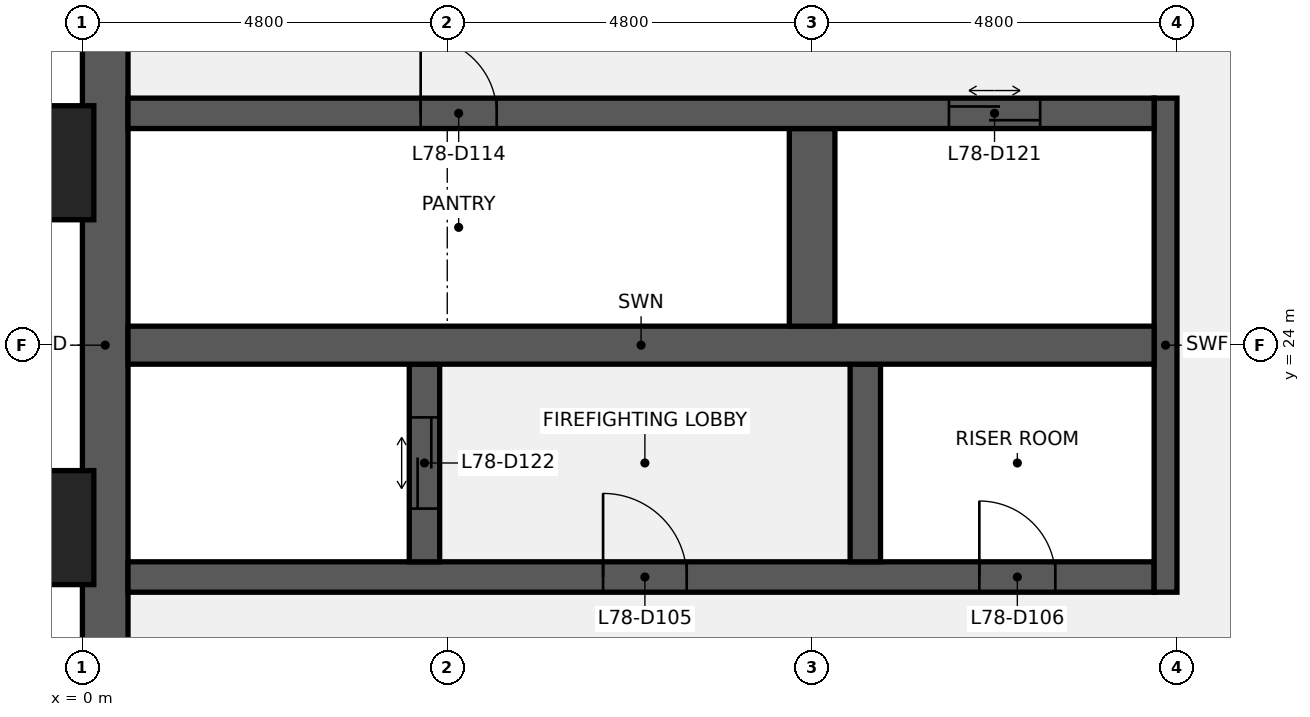
"""IFC4 building model, lengths in metres.
Left out: names, types, materials, properties, quantities, classifications, styles, units other than length and angle.
Written with IfcOpenShell. Run it as: python <this file> out.ifc"""

import sys

from ifc_helpers import new_model, si_unit, direction, frame, frame_2d, origin, origin_2d, place, context, subcontext, project, spatial, rectangle, extrude, element, fill, save


model = new_model("IFC4")
c1 = context("Model", 3, precision=1e-05, world=origin(), true_north=direction((0.0, 1.0)))
c2 = subcontext(c1, "Body", "Model", "MODEL_VIEW")
j1 = project(units=[si_unit("LENGTHUNIT", "METRE"), si_unit("PLANEANGLEUNIT", "RADIAN")], contexts=[c1])
p1 = place(None, origin())
s1 = spatial("IfcSite", under=j1, at=p1, CompositionType="ELEMENT")
p2 = place(p1, origin())
s2 = spatial("IfcBuilding", under=s1, at=p2, CompositionType="ELEMENT")
p3 = place(p2, frame((0.0, 0.0, 350.3)))
s3 = spatial("IfcBuildingStorey", under=s2, at=p3, CompositionType="ELEMENT", Elevation=350.3)
p4 = place(p3, frame((0.3, 9.6, 0.0), z_axis=(0.0, 0.0, 1.0), x_axis=(0.0, 1.0, 0.0)))
e1 = element("IfcWall", 1, at=p4, inside=s3, PredefinedType="SHEAR", context=c2, shape_type="SweptSolid", body=[
    extrude(rectangle(XDim=28.8, YDim=0.6, at=frame_2d((14.4, 0.0))), origin(), (0.0, 0.0, 1.0), 3.75),
])
p5 = place(p4, frame((8.85, 0.0, 0.9)))
e2 = element("IfcOpeningElement", 2, at=p5, cuts=e1, PredefinedType="OPENING", context=c2, shape_type="SweptSolid", body=[
    extrude(rectangle(XDim=1.5, YDim=1.5, at=frame_2d((0.75, 0.75))), frame((0.0, 0.31, 0.0), z_axis=(0.0, -1.0, 0.0), x_axis=(1.0, 0.0, 0.0)), (0.0, 0.0, 1.0), 0.62),
])
p6 = place(p4, frame((18.45, 0.0, 0.9)))
e3 = element("IfcOpeningElement", 3, at=p6, cuts=e1, PredefinedType="OPENING", context=c2, shape_type="SweptSolid", body=[
    extrude(rectangle(XDim=1.5, YDim=1.5, at=frame_2d((0.75, 0.75))), frame((0.0, 0.31, 0.0), z_axis=(0.0, -1.0, 0.0), x_axis=(1.0, 0.0, 0.0)), (0.0, 0.0, 1.0), 0.62),
])
p7 = place(p3, frame((0.6, 20.95, 0.0), z_axis=(0.0, 0.0, 1.0), x_axis=(1.0, 0.0, 0.0)))
e4 = element("IfcWall", 4, at=p7, inside=s3, PredefinedType="SHEAR", context=c2, shape_type="SweptSolid", body=[
    extrude(rectangle(XDim=13.5, YDim=0.4, at=frame_2d((6.75, 0.0))), origin(), (0.0, 0.0, 1.0), 3.75),
])
p8 = place(p7, frame((6.25, 0.0, 0.0)))
e5 = element("IfcOpeningElement", 5, at=p8, cuts=e4, PredefinedType="OPENING", context=c2, shape_type="SweptSolid", body=[
    extrude(rectangle(XDim=1.1, YDim=2.1, at=frame_2d((0.55, 1.05))), frame((0.0, 0.21, 0.0), z_axis=(0.0, -1.0, 0.0), x_axis=(1.0, 0.0, 0.0)), (0.0, 0.0, 1.0), 0.42),
])
p9 = place(p7, frame((11.2, 0.0, 0.0)))
e6 = element("IfcOpeningElement", 6, at=p9, cuts=e4, PredefinedType="OPENING", context=c2, shape_type="SweptSolid", body=[
    extrude(rectangle(XDim=1.0, YDim=2.1, at=frame_2d((0.5, 1.05))), frame((0.0, 0.21, 0.0), z_axis=(0.0, -1.0, 0.0), x_axis=(1.0, 0.0, 0.0)), (0.0, 0.0, 1.0), 0.42),
])
p10 = place(p3, frame((14.25, 20.75, 0.0), z_axis=(0.0, 0.0, 1.0), x_axis=(0.0, 1.0, 0.0)))
e7 = element("IfcWall", 7, at=p10, inside=s3, PredefinedType="SHEAR", context=c2, shape_type="SweptSolid", body=[
    extrude(rectangle(XDim=6.5, YDim=0.3, at=frame_2d((3.25, 0.0))), origin(), (0.0, 0.0, 1.0), 3.75),
])
p11 = place(p3, frame((4.5, 21.15, 0.0), z_axis=(0.0, 0.0, 1.0), x_axis=(0.0, 1.0, 0.0)))
e8 = element("IfcWall", 8, at=p11, inside=s3, PredefinedType="SHEAR", context=c2, shape_type="SweptSolid", body=[
    extrude(rectangle(XDim=2.6, YDim=0.4, at=frame_2d((1.3, 0.0))), origin(), (0.0, 0.0, 1.0), 3.75),
])
p12 = place(p11, frame((0.7, 0.0, 0.0)))
e9 = element("IfcOpeningElement", 9, at=p12, cuts=e8, PredefinedType="OPENING", context=c2, shape_type="SweptSolid", body=[
    extrude(rectangle(XDim=1.2, YDim=2.1, at=frame_2d((0.6, 1.05))), frame((0.0, 0.21, 0.0), z_axis=(0.0, -1.0, 0.0), x_axis=(1.0, 0.0, 0.0)), (0.0, 0.0, 1.0), 0.42),
])
p13 = place(p3, frame((10.3, 21.15, 0.0), z_axis=(0.0, 0.0, 1.0), x_axis=(0.0, 1.0, 0.0)))
e10 = element("IfcWall", 10, at=p13, inside=s3, PredefinedType="SHEAR", context=c2, shape_type="SweptSolid", body=[
    extrude(rectangle(XDim=2.6, YDim=0.4, at=frame_2d((1.3, 0.0))), origin(), (0.0, 0.0, 1.0), 3.75),
])
p14 = place(p3, frame((0.6, 24.0, 0.0), z_axis=(0.0, 0.0, 1.0), x_axis=(1.0, 0.0, 0.0)))
e11 = element("IfcWall", 11, at=p14, inside=s3, PredefinedType="SHEAR", context=c2, shape_type="SweptSolid", body=[
    extrude(rectangle(XDim=13.5, YDim=0.5, at=frame_2d((6.75, 0.0))), origin(), (0.0, 0.0, 1.0), 3.75),
])
p15 = place(p3, frame((9.6, 24.25, 0.0), z_axis=(0.0, 0.0, 1.0), x_axis=(0.0, 1.0, 0.0)))
e12 = element("IfcWall", 12, at=p15, inside=s3, PredefinedType="SHEAR", context=c2, shape_type="SweptSolid", body=[
    extrude(rectangle(XDim=2.6, YDim=0.6, at=frame_2d((1.3, 0.0))), origin(), (0.0, 0.0, 1.0), 3.75),
])
p16 = place(p3, frame((0.6, 27.05, 0.0), z_axis=(0.0, 0.0, 1.0), x_axis=(1.0, 0.0, 0.0)))
e13 = element("IfcWall", 13, at=p16, inside=s3, PredefinedType="SHEAR", context=c2, shape_type="SweptSolid", body=[
    extrude(rectangle(XDim=13.5, YDim=0.4, at=frame_2d((6.75, 0.0))), origin(), (0.0, 0.0, 1.0), 3.75),
])
p17 = place(p16, frame((3.85, 0.0, 0.0)))
e14 = element("IfcOpeningElement", 14, at=p17, cuts=e13, PredefinedType="OPENING", context=c2, shape_type="SweptSolid", body=[
    extrude(rectangle(XDim=1.0, YDim=2.1, at=frame_2d((0.5, 1.05))), frame((0.0, 0.21, 0.0), z_axis=(0.0, -1.0, 0.0), x_axis=(1.0, 0.0, 0.0)), (0.0, 0.0, 1.0), 0.42),
])
p18 = place(p16, frame((10.8, 0.0, 0.0)))
e15 = element("IfcOpeningElement", 15, at=p18, cuts=e13, PredefinedType="OPENING", context=c2, shape_type="SweptSolid", body=[
    extrude(rectangle(XDim=1.2, YDim=2.1, at=frame_2d((0.6, 1.05))), frame((0.0, 0.21, 0.0), z_axis=(0.0, -1.0, 0.0), x_axis=(1.0, 0.0, 0.0)), (0.0, 0.0, 1.0), 0.42),
])
for number, where, z_axis, x_axis in (
    (16, (-0.75, 21.6, 0.0), (0.0, 0.0, 1.0), (0.0, 1.0, 0.0)),
    (17, (-0.75, 26.4, 0.0), (0.0, 0.0, 1.0), (0.0, 1.0, 0.0)),
):
    element("IfcColumn", number, at=place(p3, frame(where, z_axis=z_axis, x_axis=x_axis)), inside=s3, PredefinedType="PILASTER", context=c2, shape_type="SweptSolid", body=[
        extrude(rectangle(XDim=1.8, YDim=1.5, at=origin_2d()), origin(), (0.0, 0.0, 1.0), 4.0),
    ])
p19 = place(p8, origin())
e18 = element("IfcDoor", 18, at=p19, inside=s3, OperationType="SINGLE_SWING_LEFT", PredefinedType="DOOR", context=c2, shape_type="SweptSolid", body=[
    extrude(rectangle(XDim=1.1, YDim=2.1, at=frame_2d((0.55, 1.05))), frame((0.0, 0.025, 0.0), z_axis=(0.0, -1.0, 0.0), x_axis=(1.0, 0.0, 0.0)), (0.0, 0.0, 1.0), 0.05),
])
fill(e5, e18)
p20 = place(p9, origin())
e19 = element("IfcDoor", 19, at=p20, inside=s3, OperationType="SINGLE_SWING_LEFT", PredefinedType="DOOR", context=c2, shape_type="SweptSolid", body=[
    extrude(rectangle(XDim=1.0, YDim=2.1, at=frame_2d((0.5, 1.05))), frame((0.0, 0.025, 0.0), z_axis=(0.0, -1.0, 0.0), x_axis=(1.0, 0.0, 0.0)), (0.0, 0.0, 1.0), 0.05),
])
fill(e6, e19)
p21 = place(p17, origin())
e20 = element("IfcDoor", 20, at=p21, inside=s3, OperationType="SINGLE_SWING_LEFT", PredefinedType="DOOR", context=c2, shape_type="SweptSolid", body=[
    extrude(rectangle(XDim=1.0, YDim=2.1, at=frame_2d((0.5, 1.05))), frame((0.0, 0.025, 0.0), z_axis=(0.0, -1.0, 0.0), x_axis=(1.0, 0.0, 0.0)), (0.0, 0.0, 1.0), 0.05),
])
fill(e14, e20)
p22 = place(p18, origin())
e21 = element("IfcDoor", 21, at=p22, inside=s3, OperationType="DOUBLE_DOOR_SLIDING", PredefinedType="DOOR", context=c2, shape_type="SweptSolid", body=[
    extrude(rectangle(XDim=1.2, YDim=2.1, at=frame_2d((0.6, 1.05))), frame((0.0, 0.025, 0.0), z_axis=(0.0, -1.0, 0.0), x_axis=(1.0, 0.0, 0.0)), (0.0, 0.0, 1.0), 0.05),
])
fill(e15, e21)
p23 = place(p12, origin())
e22 = element("IfcDoor", 22, at=p23, inside=s3, OperationType="DOUBLE_DOOR_SLIDING", PredefinedType="DOOR", context=c2, shape_type="SweptSolid", body=[
    extrude(rectangle(XDim=1.2, YDim=2.1, at=frame_2d((0.6, 1.05))), frame((0.0, 0.025, 0.0), z_axis=(0.0, -1.0, 0.0), x_axis=(1.0, 0.0, 0.0)), (0.0, 0.0, 1.0), 0.05),
])
fill(e9, e22)
save(model, sys.argv[1])
